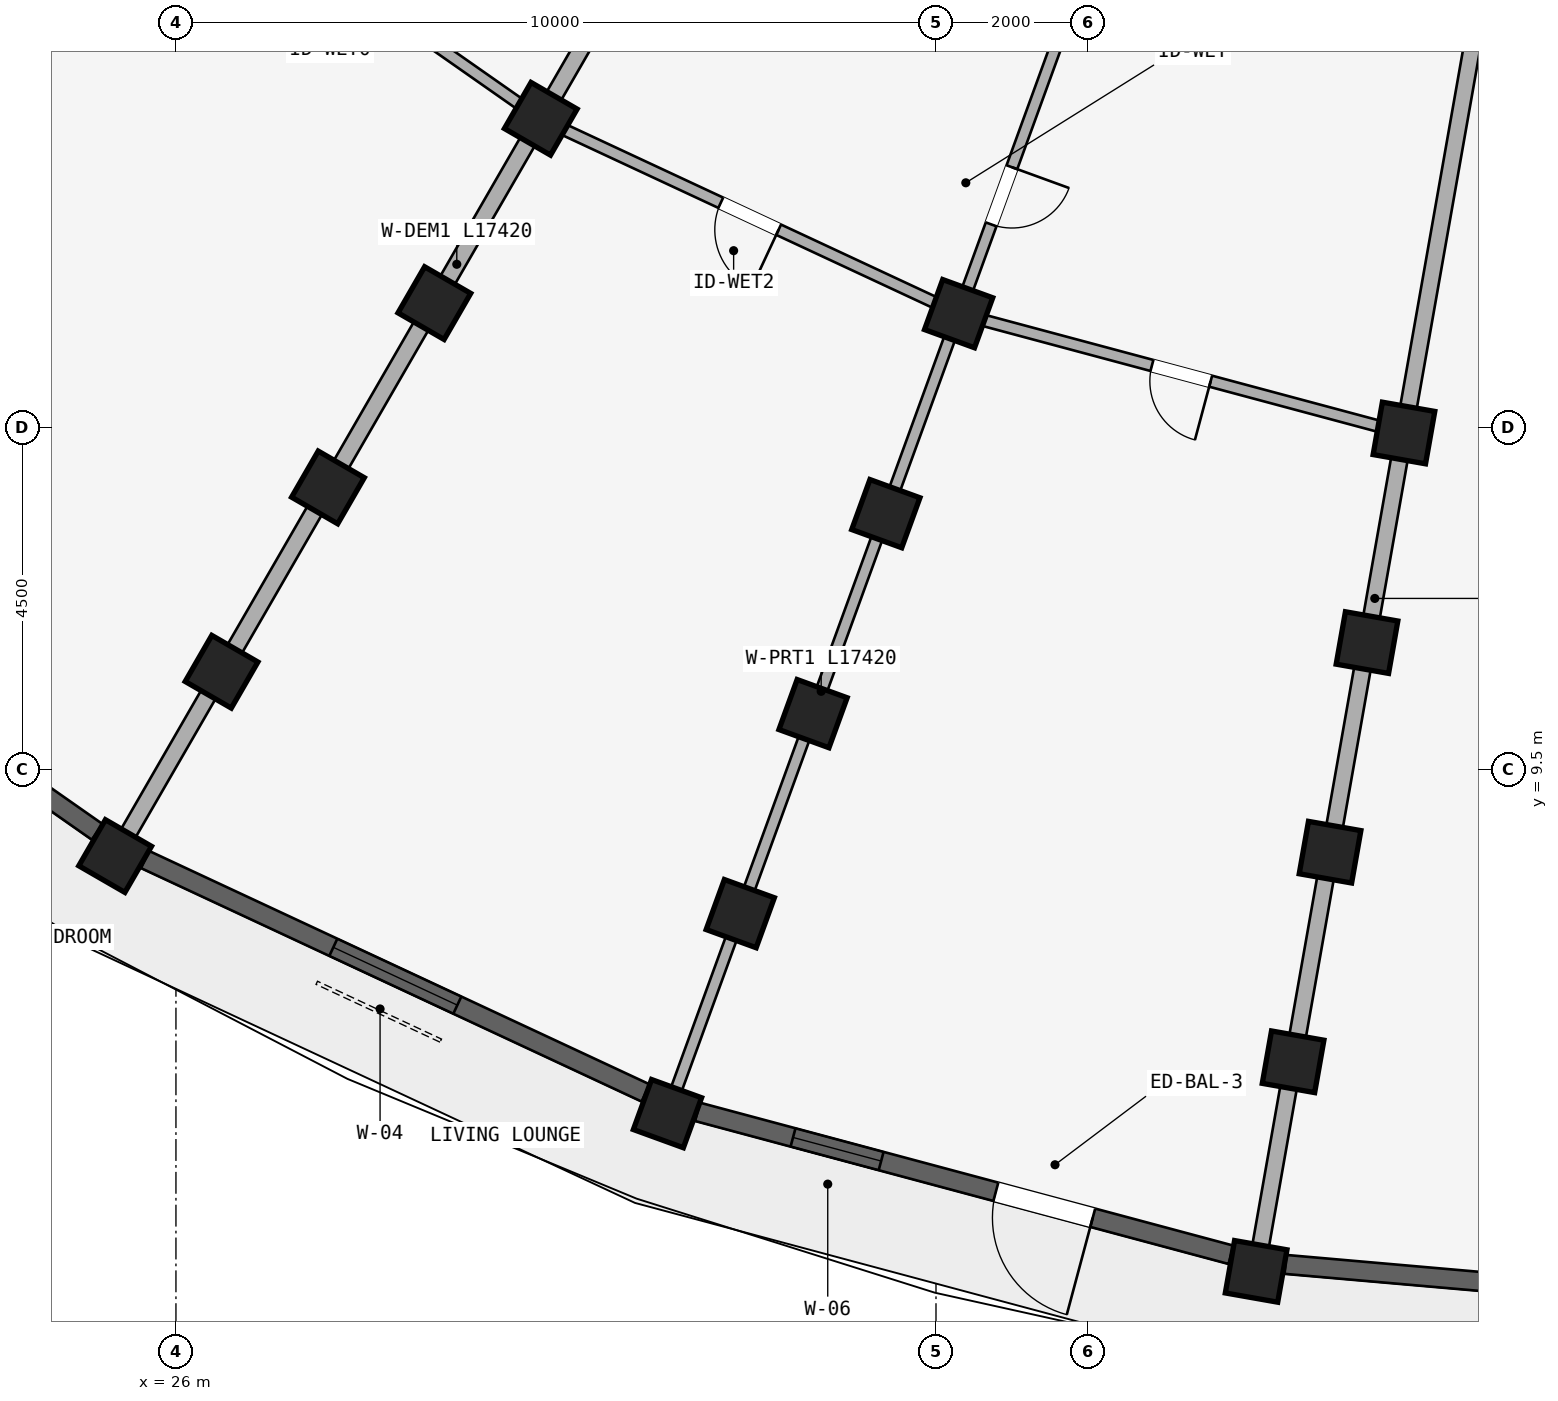
"""IFC4 building model, lengths in metres.
Left out: names, types, materials, properties, quantities, classifications, styles, units other than length and angle.
Written with IfcOpenShell. Run it as: python <this file> out.ifc"""

import sys

from ifc_helpers import new_model, si_unit, direction, frame, frame_2d, origin, origin_2d, place, context, subcontext, project, spatial, rectangle, extrude, element, fill, save


model = new_model("IFC4")
c1 = context("Model", 3, precision=1e-05, world=origin(), true_north=direction((0.0, 1.0)))
c2 = subcontext(c1, "Body", "Model", "MODEL_VIEW")
j1 = project(units=[si_unit("LENGTHUNIT", "METRE"), si_unit("PLANEANGLEUNIT", "RADIAN")], contexts=[c1])
p1 = place(None, origin())
s1 = spatial("IfcSite", under=j1, at=p1, CompositionType="ELEMENT")
p2 = place(p1, origin())
s2 = spatial("IfcBuilding", under=s1, at=p2, CompositionType="ELEMENT")
p3 = place(p2, frame((0.0, 0.0, 18.15)))
s3 = spatial("IfcBuildingStorey", under=s2, at=p3, CompositionType="ELEMENT", Elevation=18.15)
for number, where, z_axis, x_axis in (
    (1, (42.157, 13.929, 0.0), (0.0, 0.0, 1.0), (-0.985, 0.174, 0.0)),
    (2, (41.671, 11.171, 0.0), (0.0, 0.0, 1.0), (-0.985, 0.174, 0.0)),
    (3, (41.185, 8.414, 0.0), (0.0, 0.0, 1.0), (-0.985, 0.174, 0.0)),
    (4, (40.698, 5.656, 0.0), (0.0, 0.0, 1.0), (-0.985, 0.174, 0.0)),
):
    element("IfcColumn", number, at=place(p3, frame(where, z_axis=z_axis, x_axis=x_axis)), inside=s3, PredefinedType="COLUMN", context=c2, shape_type="SweptSolid", body=[
        extrude(rectangle(XDim=0.7, YDim=0.7, at=origin_2d()), origin(), (0.0, 0.0, 1.0), 2.93),
    ])
p4 = place(p3, frame((40.212, 2.899, 0.0), z_axis=(0.0, 0.0, 1.0), x_axis=(-0.984807753012, 0.173648177667, 0.0)))
e5 = element("IfcColumn", 5, at=p4, inside=s3, PredefinedType="COLUMN", context=c2, shape_type="SweptSolid", body=[
    extrude(rectangle(XDim=0.7, YDim=0.7, at=origin_2d()), origin(), (0.0, 0.0, 1.0), 2.97),
])
for number, where, z_axis, x_axis in (
    (6, (36.298, 15.499, 0.0), (0.0, 0.0, 1.0), (-0.94, 0.342, 0.0)),
    (7, (35.34, 12.868, 0.0), (0.0, 0.0, 1.0), (-0.94, 0.342, 0.0)),
    (8, (34.382, 10.236, 0.0), (0.0, 0.0, 1.0), (-0.94, 0.342, 0.0)),
    (9, (33.425, 7.605, 0.0), (0.0, 0.0, 1.0), (-0.94, 0.342, 0.0)),
):
    element("IfcColumn", number, at=place(p3, frame(where, z_axis=z_axis, x_axis=x_axis)), inside=s3, PredefinedType="COLUMN", context=c2, shape_type="SweptSolid", body=[
        extrude(rectangle(XDim=0.7, YDim=0.7, at=origin_2d()), origin(), (0.0, 0.0, 1.0), 2.93),
    ])
p5 = place(p3, frame((32.467, 4.974, 0.0), z_axis=(0.0, 0.0, 1.0), x_axis=(-0.939692620786, 0.342020143326, 0.0)))
e10 = element("IfcColumn", 10, at=p5, inside=s3, PredefinedType="COLUMN", context=c2, shape_type="SweptSolid", body=[
    extrude(rectangle(XDim=0.7, YDim=0.7, at=origin_2d()), origin(), (0.0, 0.0, 1.0), 2.97),
])
for number, where, z_axis, x_axis in (
    (11, (30.8, 18.062, 0.0), (0.0, 0.0, 1.0), (-0.866, 0.5, 0.0)),
    (12, (29.4, 15.637, 0.0), (0.0, 0.0, 1.0), (-0.866, 0.5, 0.0)),
    (13, (28.0, 13.213, 0.0), (0.0, 0.0, 1.0), (-0.866, 0.5, 0.0)),
    (14, (26.6, 10.788, 0.0), (0.0, 0.0, 1.0), (-0.866, 0.5, 0.0)),
):
    element("IfcColumn", number, at=place(p3, frame(where, z_axis=z_axis, x_axis=x_axis)), inside=s3, PredefinedType="COLUMN", context=c2, shape_type="SweptSolid", body=[
        extrude(rectangle(XDim=0.7, YDim=0.7, at=origin_2d()), origin(), (0.0, 0.0, 1.0), 2.93),
    ])
p6 = place(p3, frame((25.2, 8.363, 0.0), z_axis=(0.0, 0.0, 1.0), x_axis=(-0.866025403784, 0.5, 0.0)))
e15 = element("IfcColumn", 15, at=p6, inside=s3, PredefinedType="COLUMN", context=c2, shape_type="SweptSolid", body=[
    extrude(rectangle(XDim=0.7, YDim=0.7, at=origin_2d()), origin(), (0.0, 0.0, 1.0), 2.97),
])
p7 = place(p3, frame((24.031, 19.397, 0.0), z_axis=(0.0, 0.0, 1.0), x_axis=(-0.766044443119, 0.642787609687, 0.0)))
e16 = element("IfcColumn", 16, at=p7, inside=s3, PredefinedType="COLUMN", context=c2, shape_type="SweptSolid", body=[
    extrude(rectangle(XDim=0.7, YDim=0.7, at=origin_2d()), origin(), (0.0, 0.0, 1.0), 2.93),
])
p8 = place(p3, frame((43.286, 20.33, 0.0), z_axis=(0.0, 0.0, 1.0), x_axis=(-0.173646216546, -0.984808098809, 0.0)))
e17 = element("IfcWall", 17, at=p8, inside=s3, PredefinedType="STANDARD", context=c2, shape_type="SweptSolid", body=[
    extrude(rectangle(XDim=17.42, YDim=0.22, at=frame_2d((8.71, 0.0))), origin(), (0.0, 0.0, 1.0), 2.372),
])
p9 = place(p3, frame((38.521, 21.607, 0.0), z_axis=(0.0, 0.0, 1.0), x_axis=(-0.342022120477, -0.939691901159, 0.0)))
e18 = element("IfcWall", 18, at=p9, inside=s3, PredefinedType="PARTITIONING", context=c2, shape_type="SweptSolid", body=[
    extrude(rectangle(XDim=17.42, YDim=0.15, at=frame_2d((8.71, 0.0))), origin(), (0.0, 0.0, 1.0), 2.372),
])
p10 = place(p9, frame((4.45, 0.0, 0.0)))
e19 = element("IfcOpeningElement", 19, at=p10, cuts=e18, PredefinedType="OPENING", context=c2, shape_type="SweptSolid", body=[
    extrude(rectangle(XDim=0.8, YDim=2.1, at=frame_2d((0.4, 1.05))), frame((0.0, 0.085, 0.0), z_axis=(0.0, -1.0, 0.0), x_axis=(1.0, 0.0, 0.0)), (0.0, 0.0, 1.0), 0.17),
])
p11 = place(p3, frame((34.05, 23.691, 0.0), z_axis=(0.0, 0.0, 1.0), x_axis=(-0.499997843263, -0.866026648973, 0.0)))
e20 = element("IfcWall", 20, at=p11, inside=s3, PredefinedType="STANDARD", context=c2, shape_type="SweptSolid", body=[
    extrude(rectangle(XDim=17.42, YDim=0.22, at=frame_2d((8.71, 0.0))), origin(), (0.0, 0.0, 1.0), 2.372),
])
p12 = place(p3, frame((30.009, 26.521, 0.0), z_axis=(0.0, 0.0, 1.0), x_axis=(-0.642784757967, -0.766046835987, 0.0)))
e21 = element("IfcWall", 21, at=p12, inside=s3, PredefinedType="PARTITIONING", context=c2, shape_type="SweptSolid", body=[
    extrude(rectangle(XDim=17.42, YDim=0.15, at=frame_2d((8.71, 0.0))), origin(), (0.0, 0.0, 1.0), 2.372),
])
p13 = place(p12, frame((4.45, 0.0, 0.0)))
e22 = element("IfcOpeningElement", 22, at=p13, cuts=e21, PredefinedType="OPENING", context=c2, shape_type="SweptSolid", body=[
    extrude(rectangle(XDim=0.8, YDim=2.1, at=frame_2d((0.4, 1.05))), frame((0.0, 0.085, 0.0), z_axis=(0.0, -1.0, 0.0), x_axis=(1.0, 0.0, 0.0)), (0.0, 0.0, 1.0), 0.17),
])
p14 = place(p3, frame((26.521, 30.009, 0.0), z_axis=(0.0, 0.0, 1.0), x_axis=(-0.766046835987, -0.642784757967, 0.0)))
e23 = element("IfcWall", 23, at=p14, inside=s3, PredefinedType="STANDARD", context=c2, shape_type="SweptSolid", body=[
    extrude(rectangle(XDim=17.42, YDim=0.22, at=frame_2d((8.71, 0.0))), origin(), (0.0, 0.0, 1.0), 2.372),
])
p15 = place(p3, frame((42.157, 13.929, 0.0), z_axis=(0.0, 0.0, 1.0), x_axis=(-0.965923618901, 0.258827283048, 0.0)))
e24 = element("IfcWall", 24, at=p15, inside=s3, PredefinedType="PLUMBINGWALL", context=c2, shape_type="SweptSolid", body=[
    extrude(rectangle(XDim=6.066, YDim=0.15, at=frame_2d((3.033, 0.0))), origin(), (0.0, 0.0, 1.0), 2.372),
])
p16 = place(p15, frame((2.633, 0.0, 0.0)))
e25 = element("IfcOpeningElement", 25, at=p16, cuts=e24, PredefinedType="OPENING", context=c2, shape_type="SweptSolid", body=[
    extrude(rectangle(XDim=0.8, YDim=2.1, at=frame_2d((0.4, 1.05))), frame((0.0, 0.085, 0.0), z_axis=(0.0, -1.0, 0.0), x_axis=(1.0, 0.0, 0.0)), (0.0, 0.0, 1.0), 0.17),
])
p17 = place(p3, frame((36.298, 15.499, 0.0), z_axis=(0.0, 0.0, 1.0), x_axis=(-0.906312656069, 0.42260781991, 0.0)))
e26 = element("IfcWall", 26, at=p17, inside=s3, PredefinedType="PLUMBINGWALL", context=c2, shape_type="SweptSolid", body=[
    extrude(rectangle(XDim=6.066, YDim=0.15, at=frame_2d((3.033, 0.0))), origin(), (0.0, 0.0, 1.0), 2.372),
])
p18 = place(p17, frame((2.613, 0.0, 0.0)))
e27 = element("IfcOpeningElement", 27, at=p18, cuts=e26, PredefinedType="OPENING", context=c2, shape_type="SweptSolid", body=[
    extrude(rectangle(XDim=0.84, YDim=2.1, at=frame_2d((0.42, 1.05))), frame((0.0, 0.085, 0.0), z_axis=(0.0, -1.0, 0.0), x_axis=(1.0, 0.0, 0.0)), (0.0, 0.0, 1.0), 0.17),
])
p19 = place(p3, frame((30.8, 18.062, 0.0), z_axis=(0.0, 0.0, 1.0), x_axis=(-0.81913926159, 0.573594691504, 0.0)))
e28 = element("IfcWall", 28, at=p19, inside=s3, PredefinedType="PLUMBINGWALL", context=c2, shape_type="SweptSolid", body=[
    extrude(rectangle(XDim=6.066, YDim=0.15, at=frame_2d((3.033, 0.0))), origin(), (0.0, 0.0, 1.0), 2.372),
])
p20 = place(p19, frame((2.653, 0.0, 0.0)))
e29 = element("IfcOpeningElement", 29, at=p20, cuts=e28, PredefinedType="OPENING", context=c2, shape_type="SweptSolid", body=[
    extrude(rectangle(XDim=0.76, YDim=2.05, at=frame_2d((0.38, 1.025))), frame((0.0, 0.085, 0.0), z_axis=(0.0, -1.0, 0.0), x_axis=(1.0, 0.0, 0.0)), (0.0, 0.0, 1.0), 0.17),
])
p21 = place(p3, frame((47.836, 2.357, 0.0), z_axis=(0.0, 0.0, 1.0), x_axis=(-0.99619214922, 0.08718487158, 0.0)))
e30 = element("IfcWall", 30, at=p21, inside=s3, PredefinedType="STANDARD", context=c2, shape_type="SweptSolid", body=[
    extrude(rectangle(XDim=7.267, YDim=0.25, at=frame_2d((3.633, 0.0))), origin(), (0.0, 0.0, 1.0), 2.412),
])
p22 = place(p21, frame((2.583, 0.0, 0.412)))
e31 = element("IfcOpeningElement", 31, at=p22, cuts=e30, PredefinedType="OPENING", context=c2, shape_type="SweptSolid", body=[
    extrude(rectangle(XDim=2.1, YDim=1.8, at=frame_2d((1.05, 0.9))), frame((0.0, 0.135, 0.0), z_axis=(0.0, -1.0, 0.0), x_axis=(1.0, 0.0, 0.0)), (0.0, 0.0, 1.0), 0.27),
])
p23 = place(p3, frame((39.882, 3.117, 0.0), z_axis=(0.0, 0.0, 1.0), x_axis=(-0.965930355787, 0.258802140196, 0.0)))
e32 = element("IfcWall", 32, at=p23, inside=s3, PredefinedType="STANDARD", context=c2, shape_type="SweptSolid", body=[
    extrude(rectangle(XDim=7.267, YDim=0.25, at=frame_2d((3.633, 0.0))), origin(), (0.0, 0.0, 1.0), 2.412),
])
p24 = place(p23, frame((4.766, 0.0, 0.362)))
e33 = element("IfcOpeningElement", 33, at=p24, cuts=e32, PredefinedType="OPENING", context=c2, shape_type="SweptSolid", body=[
    extrude(rectangle(XDim=1.2, YDim=1.5, at=frame_2d((0.6, 0.75))), frame((0.0, 0.135, 0.0), z_axis=(0.0, -1.0, 0.0), x_axis=(1.0, 0.0, 0.0)), (0.0, 0.0, 1.0), 0.27),
])
p25 = place(p23, frame((1.883, 0.0, 0.0)))
e34 = element("IfcOpeningElement", 34, at=p25, cuts=e32, PredefinedType="OPENING", context=c2, shape_type="SweptSolid", body=[
    extrude(rectangle(XDim=1.32, YDim=2.15, at=frame_2d((0.66, 1.075))), frame((0.0, 0.135, 0.0), z_axis=(0.0, -1.0, 0.0), x_axis=(1.0, 0.0, 0.0)), (0.0, 0.0, 1.0), 0.27),
])
p26 = place(p3, frame((32.179, 5.246, 0.0), z_axis=(0.0, 0.0, 1.0), x_axis=(-0.90630327107, 0.422627946127, 0.0)))
e35 = element("IfcWall", 35, at=p26, inside=s3, PredefinedType="STANDARD", context=c2, shape_type="SweptSolid", body=[
    extrude(rectangle(XDim=7.267, YDim=0.25, at=frame_2d((3.633, 0.0))), origin(), (0.0, 0.0, 1.0), 2.412),
])
p27 = place(p26, frame((2.733, 0.0, 0.562)))
e36 = element("IfcOpeningElement", 36, at=p27, cuts=e35, PredefinedType="OPENING", context=c2, shape_type="SweptSolid", body=[
    extrude(rectangle(XDim=1.8, YDim=1.65, at=frame_2d((0.9, 0.825))), frame((0.0, 0.135, 0.0), z_axis=(0.0, -1.0, 0.0), x_axis=(1.0, 0.0, 0.0)), (0.0, 0.0, 1.0), 0.27),
])
p28 = place(p3, frame((24.964, 8.681, 0.0), z_axis=(0.0, 0.0, 1.0), x_axis=(-0.819159308599, 0.573566061701, 0.0)))
e37 = element("IfcWall", 37, at=p28, inside=s3, PredefinedType="STANDARD", context=c2, shape_type="SweptSolid", body=[
    extrude(rectangle(XDim=7.267, YDim=0.25, at=frame_2d((3.633, 0.0))), origin(), (0.0, 0.0, 1.0), 2.412),
])
p29 = place(p28, frame((2.808, 0.0, 0.462)))
e38 = element("IfcOpeningElement", 38, at=p29, cuts=e37, PredefinedType="OPENING", context=c2, shape_type="SweptSolid", body=[
    extrude(rectangle(XDim=1.65, YDim=1.75, at=frame_2d((0.825, 0.875))), frame((0.0, 0.135, 0.0), z_axis=(0.0, -1.0, 0.0), x_axis=(1.0, 0.0, 0.0)), (0.0, 0.0, 1.0), 0.27),
])
p30 = place(p24, origin())
e39 = element("IfcWindow", 39, at=p30, inside=s3, PartitioningType="SINGLE_PANEL", PredefinedType="WINDOW", context=c2, shape_type="SweptSolid", body=[
    extrude(rectangle(XDim=1.2, YDim=1.5, at=frame_2d((0.6, 0.75))), frame((0.0, 0.03, 0.0), z_axis=(0.0, -1.0, 0.0), x_axis=(1.0, 0.0, 0.0)), (0.0, 0.0, 1.0), 0.06),
])
fill(e33, e39)
p31 = place(p27, origin())
e40 = element("IfcWindow", 40, at=p31, inside=s3, PartitioningType="DOUBLE_PANEL_VERTICAL", PredefinedType="WINDOW", context=c2, shape_type="SweptSolid", body=[
    extrude(rectangle(XDim=1.8, YDim=1.65, at=frame_2d((0.9, 0.825))), frame((0.0, 0.03, 0.0), z_axis=(0.0, -1.0, 0.0), x_axis=(1.0, 0.0, 0.0)), (0.0, 0.0, 1.0), 0.06),
])
fill(e36, e40)
p32 = place(p10, origin())
e41 = element("IfcDoor", 41, at=p32, inside=s3, OperationType="SINGLE_SWING_LEFT", PredefinedType="DOOR", context=c2, shape_type="SweptSolid", body=[
    extrude(rectangle(XDim=0.8, YDim=2.1, at=frame_2d((0.4, 1.05))), frame((0.0, 0.025, 0.0), z_axis=(0.0, -1.0, 0.0), x_axis=(1.0, 0.0, 0.0)), (0.0, 0.0, 1.0), 0.05),
])
fill(e19, e41)
p33 = place(p16, origin())
e42 = element("IfcDoor", 42, at=p33, inside=s3, OperationType="SINGLE_SWING_LEFT", PredefinedType="DOOR", context=c2, shape_type="SweptSolid", body=[
    extrude(rectangle(XDim=0.8, YDim=2.1, at=frame_2d((0.4, 1.05))), frame((0.0, 0.025, 0.0), z_axis=(0.0, -1.0, 0.0), x_axis=(1.0, 0.0, 0.0)), (0.0, 0.0, 1.0), 0.05),
])
fill(e25, e42)
p34 = place(p18, frame((0.84, 0.0, 0.0), z_axis=(0.0, 0.0, 1.0), x_axis=(-1.0, 0.0, 0.0)))
e43 = element("IfcDoor", 43, at=p34, inside=s3, OperationType="SINGLE_SWING_RIGHT", PredefinedType="DOOR", context=c2, shape_type="SweptSolid", body=[
    extrude(rectangle(XDim=0.84, YDim=2.1, at=frame_2d((0.42, 1.05))), frame((0.0, 0.025, 0.0), z_axis=(0.0, -1.0, 0.0), x_axis=(1.0, 0.0, 0.0)), (0.0, 0.0, 1.0), 0.05),
])
fill(e27, e43)
p35 = place(p25, origin())
e44 = element("IfcDoor", 44, at=p35, inside=s3, OperationType="SINGLE_SWING_LEFT", PredefinedType="DOOR", context=c2, shape_type="SweptSolid", body=[
    extrude(rectangle(XDim=1.32, YDim=2.15, at=frame_2d((0.66, 1.075))), frame((0.0, 0.025, 0.0), z_axis=(0.0, -1.0, 0.0), x_axis=(1.0, 0.0, 0.0)), (0.0, 0.0, 1.0), 0.05),
])
fill(e34, e44)
save(model, sys.argv[1])
